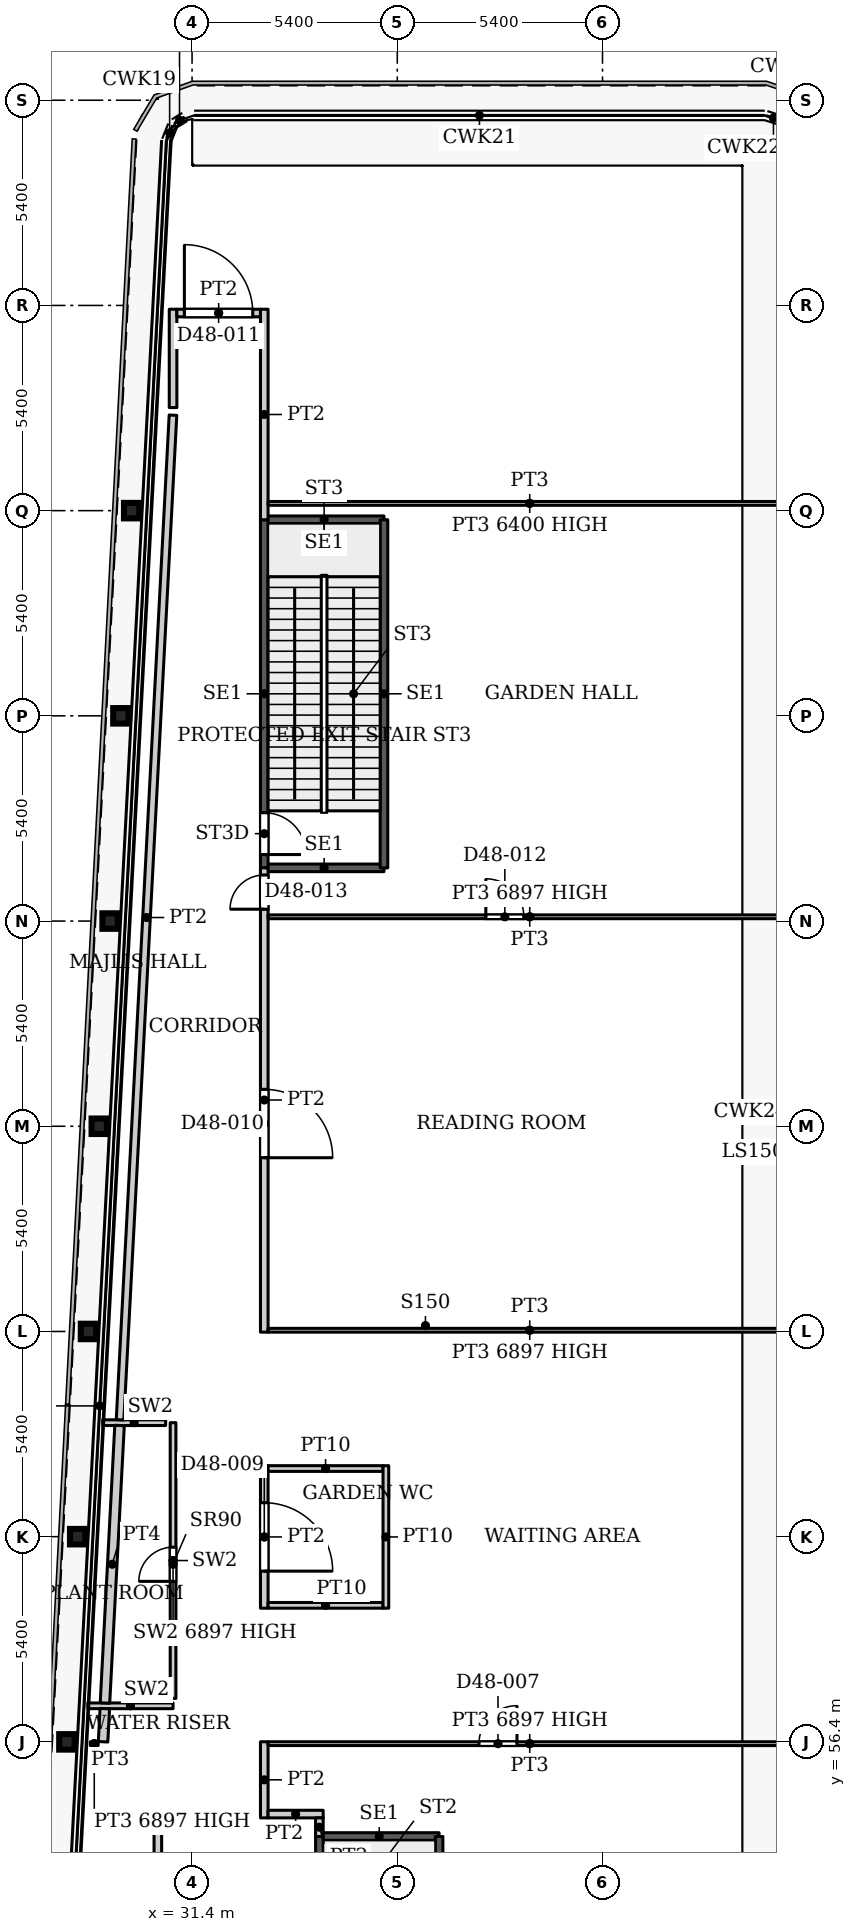
"""IFC4 building model, lengths in metres.
Left out: names, types, materials, properties, quantities, classifications, styles, units other than length and angle.
Written with IfcOpenShell. Run it as: python <this file> out.ifc"""

import sys

from ifc_helpers import new_model, si_unit, direction, frame, frame_2d, origin, origin_2d, place, context, subcontext, project, spatial, rectangle, i_section, extrude, source, transform, mapped, element, fill, save


model = new_model("IFC4")
c1 = context("Model", 3, precision=1e-05, world=origin(), true_north=direction((0.0, 1.0)))
c2 = subcontext(c1, "Body", "Model", "MODEL_VIEW")
j1 = project(units=[si_unit("LENGTHUNIT", "METRE"), si_unit("PLANEANGLEUNIT", "RADIAN")], contexts=[c1])
p1 = place(None, origin())
s1 = spatial("IfcSite", under=j1, at=p1, CompositionType="ELEMENT")
p2 = place(p1, origin())
s2 = spatial("IfcBuilding", under=s1, at=p2, CompositionType="ELEMENT")
p3 = place(p2, frame((0.0, 0.0, 203.3)))
s3 = spatial("IfcBuildingStorey", under=s2, at=p3, CompositionType="ELEMENT", Elevation=203.3)
for number, where, z_axis, x_axis in (
    (1, (28.106, 56.4, 0.0), (0.0, 0.0, 1.0), (1.0, 0.0, 0.0)),
    (2, (28.39, 61.8, 0.0), (0.0, 0.0, 1.0), (1.0, 0.0, 0.0)),
    (3, (28.674, 67.2, 0.0), (0.0, 0.0, 1.0), (1.0, 0.0, 0.0)),
    (4, (28.958, 72.6, 0.0), (0.0, 0.0, 1.0), (1.0, 0.0, 0.0)),
    (5, (29.243, 78.0, 0.0), (0.0, 0.0, 1.0), (1.0, 0.0, 0.0)),
    (6, (29.527, 83.4, 0.0), (0.0, 0.0, 1.0), (1.0, 0.0, 0.0)),
    (7, (29.811, 88.8, 0.0), (0.0, 0.0, 1.0), (1.0, 0.0, 0.0)),
):
    element("IfcColumn", number, at=place(p3, frame(where, z_axis=z_axis, x_axis=x_axis)), inside=s3, PredefinedType="COLUMN", context=c2, shape_type="SweptSolid", body=[
        extrude(i_section(OverallWidth=0.404, OverallDepth=0.407, WebThickness=0.027, FlangeThickness=0.044, FilletRadius=0.012, at=origin_2d()), origin(), (0.0, 0.0, 1.0), 7.8),
    ])
p4 = place(p3, frame((34.75, 53.91, 0.0), z_axis=(0.0, 0.0, 1.0), x_axis=(1.0, 0.0, 0.0)))
e8 = element("IfcWall", 8, at=p4, inside=s3, PredefinedType="SHEAR", context=c2, shape_type="SweptSolid", body=[
    extrude(rectangle(XDim=3.15, YDim=0.2, at=frame_2d((1.575, 0.0))), origin(), (0.0, 0.0, 1.0), 7.8),
])
p5 = place(p3, frame((34.75, 47.5, 0.0), z_axis=(0.0, 0.0, 1.0), x_axis=(0.0, 1.0, 0.0)))
e9 = element("IfcWall", 9, at=p5, inside=s3, PredefinedType="SHEAR", context=c2, shape_type="SweptSolid", body=[
    extrude(rectangle(XDim=6.41, YDim=0.2, at=frame_2d((3.205, 0.0))), origin(), (0.0, 0.0, 1.0), 7.8),
])
p6 = place(p3, frame((37.9, 44.75, 0.0), z_axis=(0.0, 0.0, 1.0), x_axis=(0.0, 1.0, 0.0)))
e10 = element("IfcWall", 10, at=p6, inside=s3, PredefinedType="SHEAR", context=c2, shape_type="SweptSolid", body=[
    extrude(rectangle(XDim=9.16, YDim=0.2, at=frame_2d((4.58, 0.0))), origin(), (0.0, 0.0, 1.0), 7.8),
])
for number, where, z_axis, x_axis in (
    (11, (33.3, 79.4, 0.0), (0.0, 0.0, 1.0), (1.0, 0.0, 0.0)),
    (12, (33.3, 88.56, 0.0), (0.0, 0.0, 1.0), (1.0, 0.0, 0.0)),
):
    element("IfcWall", number, at=place(p3, frame(where, z_axis=z_axis, x_axis=x_axis)), inside=s3, PredefinedType="SHEAR", context=c2, shape_type="SweptSolid", body=[
        extrude(rectangle(XDim=3.15, YDim=0.2, at=frame_2d((1.575, 0.0))), origin(), (0.0, 0.0, 1.0), 7.8),
    ])
p7 = place(p3, frame((33.3, 79.4, 0.0), z_axis=(0.0, 0.0, 1.0), x_axis=(0.0, 1.0, 0.0)))
e13 = element("IfcWall", 13, at=p7, inside=s3, PredefinedType="SHEAR", context=c2, shape_type="SweptSolid", body=[
    extrude(rectangle(XDim=9.16, YDim=0.2, at=frame_2d((4.58, 0.0))), origin(), (0.0, 0.0, 1.0), 7.8),
])
p8 = place(p7, frame((0.35, 0.0, 0.0)))
e14 = element("IfcOpeningElement", 14, at=p8, cuts=e13, PredefinedType="OPENING", context=c2, shape_type="SweptSolid", body=[
    extrude(rectangle(XDim=1.1, YDim=2.2, at=frame_2d((0.55, 1.1))), frame((0.0, 0.11, 0.0), z_axis=(0.0, -1.0, 0.0), x_axis=(1.0, 0.0, 0.0)), (0.0, 0.0, 1.0), 0.22),
])
p9 = place(p3, frame((36.45, 79.4, 0.0), z_axis=(0.0, 0.0, 1.0), x_axis=(0.0, 1.0, 0.0)))
e15 = element("IfcWall", 15, at=p9, inside=s3, PredefinedType="SHEAR", context=c2, shape_type="SweptSolid", body=[
    extrude(rectangle(XDim=9.16, YDim=0.2, at=frame_2d((4.58, 0.0))), origin(), (0.0, 0.0, 1.0), 7.8),
])
p10 = place(p3, frame((28.658, 57.349, 0.0), z_axis=(0.0, 0.0, 1.0), x_axis=(1.0, 0.0, 0.0)))
e16 = element("IfcWall", 16, at=p10, inside=s3, PredefinedType="PARTITIONING", context=c2, shape_type="SweptSolid", body=[
    extrude(rectangle(XDim=2.242, YDim=0.15, at=frame_2d((1.121, 0.0))), origin(), (0.0, 0.0, 1.0), 7.8),
])
p11 = place(p3, frame((30.9, 57.544, 0.0), z_axis=(0.0, 0.0, 1.0), x_axis=(0.0, 1.0, 0.0)))
e17 = element("IfcWall", 17, at=p11, inside=s3, PredefinedType="PARTITIONING", context=c2, shape_type="SweptSolid", body=[
    extrude(rectangle(XDim=7.256, YDim=0.15, at=frame_2d((3.628, 0.0))), origin(), (0.0, 0.0, 1.0), 6.897),
])
p12 = place(p11, frame((3.08, 0.0, 0.0)))
e18 = element("IfcOpeningElement", 18, at=p12, cuts=e17, PredefinedType="OPENING", context=c2, shape_type="SweptSolid", body=[
    extrude(rectangle(XDim=0.9, YDim=2.2, at=frame_2d((0.45, 1.1))), frame((0.0, 0.085, 0.0), z_axis=(0.0, -1.0, 0.0), x_axis=(1.0, 0.0, 0.0)), (0.0, 0.0, 1.0), 0.17),
])
p13 = place(p3, frame((29.05, 64.8, 0.0), z_axis=(0.0, 0.0, 1.0), x_axis=(1.0, 0.0, 0.0)))
e19 = element("IfcWall", 19, at=p13, inside=s3, PredefinedType="PARTITIONING", context=c2, shape_type="SweptSolid", body=[
    extrude(rectangle(XDim=1.655, YDim=0.15, at=frame_2d((0.828, 0.0))), origin(), (0.0, 0.0, 1.0), 7.8),
])
p14 = place(p3, frame((28.724, 56.353, 0.0), z_axis=(0.0, 0.0, 1.0), x_axis=(1.0, 0.0, 0.0)))
e20 = element("IfcWall", 20, at=p14, inside=s3, PredefinedType="PARTITIONING", context=c2, shape_type="SweptSolid", body=[
    extrude(rectangle(XDim=0.205, YDim=0.1, at=frame_2d((0.103, 0.0))), origin(), (0.0, 0.0, 1.0), 6.897),
])
p15 = place(p3, frame((29.058, 56.403, 0.0), z_axis=(0.0, 0.0, 1.0), x_axis=(0.052573510687, 0.998617056721, 0.0)))
e21 = element("IfcWall", 21, at=p15, inside=s3, PredefinedType="PARTITIONING", context=c2, shape_type="SweptSolid", body=[
    extrude(rectangle(XDim=0.873, YDim=0.25, at=frame_2d((0.437, 0.0))), origin(), (0.0, 0.0, 1.0), 7.5),
])
p16 = place(p3, frame((29.108, 57.423, 0.0), z_axis=(0.0, 0.0, 1.0), x_axis=(0.052513275685, 0.99862022605, 0.0)))
e22 = element("IfcWall", 22, at=p16, inside=s3, PredefinedType="PARTITIONING", context=c2, shape_type="SweptSolid", body=[
    extrude(rectangle(XDim=7.313, YDim=0.25, at=frame_2d((3.656, 0.0))), origin(), (0.0, 0.0, 1.0), 7.5),
])
p17 = place(p3, frame((29.505, 64.874, 0.0), z_axis=(0.0, 0.0, 1.0), x_axis=(0.052618850307, 0.998614668725, 0.0)))
e23 = element("IfcWall", 23, at=p17, inside=s3, PredefinedType="PARTITIONING", context=c2, shape_type="SweptSolid", body=[
    extrude(rectangle(XDim=26.475, YDim=0.2, at=frame_2d((13.237, 0.0))), origin(), (0.0, 0.0, 1.0), 7.5),
])
p18 = place(p3, frame((30.5, 47.45, 0.0), z_axis=(0.0, 0.0, 1.0), x_axis=(0.0, 1.0, 0.0)))
e24 = element("IfcWall", 24, at=p18, inside=s3, PredefinedType="PARTITIONING", context=c2, shape_type="SweptSolid", body=[
    extrude(rectangle(XDim=7.05, YDim=0.2, at=frame_2d((3.525, 0.0))), origin(), (0.0, 0.0, 1.0), 7.5),
])
p19 = place(p18, frame((2.65, 0.0, 0.0)))
e25 = element("IfcOpeningElement", 25, at=p19, cuts=e24, PredefinedType="OPENING", context=c2, shape_type="SweptSolid", body=[
    extrude(rectangle(XDim=1.8, YDim=2.1, at=frame_2d((0.9, 1.05))), frame((0.0, 0.11, 0.0), z_axis=(0.0, -1.0, 0.0), x_axis=(1.0, 0.0, 0.0)), (0.0, 0.0, 1.0), 0.22),
])
p20 = place(p3, frame((30.9, 91.512, 0.0), z_axis=(0.0, 0.0, 1.0), x_axis=(0.0, 1.0, 0.0)))
e26 = element("IfcWall", 26, at=p20, inside=s3, PredefinedType="PARTITIONING", context=c2, shape_type="SweptSolid", body=[
    extrude(rectangle(XDim=2.588, YDim=0.2, at=frame_2d((1.294, 0.0))), origin(), (0.0, 0.0, 1.0), 7.5),
])
p21 = place(p3, frame((31.0, 94.0, 0.0), z_axis=(0.0, 0.0, 1.0), x_axis=(1.0, 0.0, 0.0)))
e27 = element("IfcWall", 27, at=p21, inside=s3, PredefinedType="PARTITIONING", context=c2, shape_type="SweptSolid", body=[
    extrude(rectangle(XDim=2.2, YDim=0.2, at=frame_2d((1.1, 0.0))), origin(), (0.0, 0.0, 1.0), 7.5),
])
p22 = place(p21, frame((0.198, 0.0, 0.0)))
e28 = element("IfcOpeningElement", 28, at=p22, cuts=e27, PredefinedType="OPENING", context=c2, shape_type="SweptSolid", body=[
    extrude(rectangle(XDim=1.8, YDim=2.1, at=frame_2d((0.9, 1.05))), frame((0.0, 0.11, 0.0), z_axis=(0.0, -1.0, 0.0), x_axis=(1.0, 0.0, 0.0)), (0.0, 0.0, 1.0), 0.22),
])
p23 = place(p3, frame((33.3, 54.4, 0.0), z_axis=(0.0, 0.0, 1.0), x_axis=(0.0, 1.0, 0.0)))
e29 = element("IfcWall", 29, at=p23, inside=s3, PredefinedType="PARTITIONING", context=c2, shape_type="SweptSolid", body=[
    extrude(rectangle(XDim=2.003, YDim=0.2, at=frame_2d((1.001, 0.0))), origin(), (0.0, 0.0, 1.0), 7.5),
])
p24 = place(p3, frame((33.3, 59.918, 0.0), z_axis=(0.0, 0.0, 1.0), x_axis=(0.0, 1.0, 0.0)))
e30 = element("IfcWall", 30, at=p24, inside=s3, PredefinedType="PARTITIONING", context=c2, shape_type="SweptSolid", body=[
    extrude(rectangle(XDim=3.75, YDim=0.2, at=frame_2d((1.875, 0.0))), origin(), (0.0, 0.0, 1.0), 7.5),
])
p25 = place(p24, frame((0.975, 0.0, 0.0)))
e31 = element("IfcOpeningElement", 31, at=p25, cuts=e30, PredefinedType="OPENING", context=c2, shape_type="SweptSolid", body=[
    extrude(rectangle(XDim=1.8, YDim=2.1, at=frame_2d((0.9, 1.05))), frame((0.0, 0.11, 0.0), z_axis=(0.0, -1.0, 0.0), x_axis=(1.0, 0.0, 0.0)), (0.0, 0.0, 1.0), 0.22),
])
p26 = place(p3, frame((33.3, 67.182, 0.0), z_axis=(0.0, 0.0, 1.0), x_axis=(0.0, 1.0, 0.0)))
e32 = element("IfcWall", 32, at=p26, inside=s3, PredefinedType="PARTITIONING", context=c2, shape_type="SweptSolid", body=[
    extrude(rectangle(XDim=12.218, YDim=0.2, at=frame_2d((6.109, 0.0))), origin(), (0.0, 0.0, 1.0), 7.5),
])
p27 = place(p26, frame((4.59, 0.0, 0.0)))
e33 = element("IfcOpeningElement", 33, at=p27, cuts=e32, PredefinedType="OPENING", context=c2, shape_type="SweptSolid", body=[
    extrude(rectangle(XDim=1.8, YDim=2.1, at=frame_2d((0.9, 1.05))), frame((0.0, 0.11, 0.0), z_axis=(0.0, -1.0, 0.0), x_axis=(1.0, 0.0, 0.0)), (0.0, 0.0, 1.0), 0.22),
])
p28 = place(p26, frame((11.13, 0.0, 0.0)))
e34 = element("IfcOpeningElement", 34, at=p28, cuts=e32, PredefinedType="OPENING", context=c2, shape_type="SweptSolid", body=[
    extrude(rectangle(XDim=0.9, YDim=2.1, at=frame_2d((0.45, 1.05))), frame((0.0, 0.11, 0.0), z_axis=(0.0, -1.0, 0.0), x_axis=(1.0, 0.0, 0.0)), (0.0, 0.0, 1.0), 0.22),
])
p29 = place(p3, frame((33.3, 88.56, 0.0), z_axis=(0.0, 0.0, 1.0), x_axis=(0.0, 1.0, 0.0)))
e35 = element("IfcWall", 35, at=p29, inside=s3, PredefinedType="PARTITIONING", context=c2, shape_type="SweptSolid", body=[
    extrude(rectangle(XDim=5.54, YDim=0.2, at=frame_2d((2.77, 0.0))), origin(), (0.0, 0.0, 1.0), 7.5),
])
p30 = place(p3, frame((33.4, 54.5, 0.0), z_axis=(0.0, 0.0, 1.0), x_axis=(1.0, 0.0, 0.0)))
e36 = element("IfcWall", 36, at=p30, inside=s3, PredefinedType="PARTITIONING", context=c2, shape_type="SweptSolid", body=[
    extrude(rectangle(XDim=1.45, YDim=0.2, at=frame_2d((0.725, 0.0))), origin(), (0.0, 0.0, 1.0), 7.5),
])
p31 = place(p3, frame((33.4, 56.353, 0.0), z_axis=(0.0, 0.0, 1.0), x_axis=(1.0, 0.0, 0.0)))
e37 = element("IfcWall", 37, at=p31, inside=s3, PredefinedType="PARTITIONING", context=c2, shape_type="SweptSolid", body=[
    extrude(rectangle(XDim=13.77, YDim=0.1, at=frame_2d((6.885, 0.0))), origin(), (0.0, 0.0, 1.0), 6.897),
])
p32 = place(p31, frame((5.55, 0.0, 0.0)))
e38 = element("IfcOpeningElement", 38, at=p32, cuts=e37, PredefinedType="OPENING", context=c2, shape_type="SweptSolid", body=[
    extrude(rectangle(XDim=1.0, YDim=2.1, at=frame_2d((0.5, 1.05))), frame((0.0, 0.06, 0.0), z_axis=(0.0, -1.0, 0.0), x_axis=(1.0, 0.0, 0.0)), (0.0, 0.0, 1.0), 0.12),
])
for number, where, z_axis, x_axis in (
    (39, (33.4, 59.993, 0.0), (0.0, 0.0, 1.0), (1.0, 0.0, 0.0)),
    (40, (33.4, 63.593, 0.0), (0.0, 0.0, 1.0), (1.0, 0.0, 0.0)),
):
    element("IfcWall", number, at=place(p3, frame(where, z_axis=z_axis, x_axis=x_axis)), inside=s3, PredefinedType="PARTITIONING", context=c2, shape_type="SweptSolid", body=[
        extrude(rectangle(XDim=3.025, YDim=0.15, at=frame_2d((1.513, 0.0))), origin(), (0.0, 0.0, 1.0), 7.5),
    ])
p33 = place(p3, frame((33.4, 67.232, 0.0), z_axis=(0.0, 0.0, 1.0), x_axis=(1.0, 0.0, 0.0)))
e41 = element("IfcWall", 41, at=p33, inside=s3, PredefinedType="PARTITIONING", context=c2, shape_type="SweptSolid", body=[
    extrude(rectangle(XDim=13.77, YDim=0.1, at=frame_2d((6.885, 0.0))), origin(), (0.0, 0.0, 1.0), 6.897),
])
p34 = place(p3, frame((33.4, 78.112, 0.0), z_axis=(0.0, 0.0, 1.0), x_axis=(1.0, 0.0, 0.0)))
e42 = element("IfcWall", 42, at=p34, inside=s3, PredefinedType="PARTITIONING", context=c2, shape_type="SweptSolid", body=[
    extrude(rectangle(XDim=13.77, YDim=0.1, at=frame_2d((6.885, 0.0))), origin(), (0.0, 0.0, 1.0), 6.897),
])
p35 = place(p34, frame((5.73, 0.0, 0.0)))
e43 = element("IfcOpeningElement", 43, at=p35, cuts=e42, PredefinedType="OPENING", context=c2, shape_type="SweptSolid", body=[
    extrude(rectangle(XDim=1.0, YDim=2.1, at=frame_2d((0.5, 1.05))), frame((0.0, 0.06, 0.0), z_axis=(0.0, -1.0, 0.0), x_axis=(1.0, 0.0, 0.0)), (0.0, 0.0, 1.0), 0.12),
])
p36 = place(p3, frame((33.4, 88.991, 0.0), z_axis=(0.0, 0.0, 1.0), x_axis=(1.0, 0.0, 0.0)))
e44 = element("IfcWall", 44, at=p36, inside=s3, PredefinedType="PARTITIONING", context=c2, shape_type="SweptSolid", body=[
    extrude(rectangle(XDim=13.77, YDim=0.1, at=frame_2d((6.885, 0.0))), origin(), (0.0, 0.0, 1.0), 6.4),
])
p37 = place(p3, frame((34.75, 53.91, 0.0), z_axis=(0.0, 0.0, 1.0), x_axis=(0.0, 1.0, 0.0)))
e45 = element("IfcWall", 45, at=p37, inside=s3, PredefinedType="PARTITIONING", context=c2, shape_type="SweptSolid", body=[
    extrude(rectangle(XDim=0.49, YDim=0.2, at=frame_2d((0.245, 0.0))), origin(), (0.0, 0.0, 1.0), 7.5),
])
p38 = place(p3, frame((36.5, 59.918, 0.0), z_axis=(0.0, 0.0, 1.0), x_axis=(0.0, 1.0, 0.0)))
e46 = element("IfcWall", 46, at=p38, inside=s3, PredefinedType="PARTITIONING", context=c2, shape_type="SweptSolid", body=[
    extrude(rectangle(XDim=3.75, YDim=0.15, at=frame_2d((1.875, 0.0))), origin(), (0.0, 0.0, 1.0), 7.5),
])
m1 = source(origin(), c2, "Body", "SweptSolid", [
    extrude(rectangle(XDim=0.9, YDim=2.2, at=frame_2d((0.45, 1.1))), frame((0.0, 0.025, 0.0), z_axis=(0.0, -1.0, 0.0), x_axis=(1.0, 0.0, 0.0)), (0.0, 0.0, 1.0), 0.05),
])
p39 = place(p12, origin())
e47 = element("IfcDoor", 47, at=p39, inside=s3, OperationType="SINGLE_SWING_LEFT", PredefinedType="DOOR", context=c2, shape_type="MappedRepresentation", body=[
    mapped(m1, transform((0.0, 0.0, 0.0), x_axis=(1.0, 0.0, 0.0), y_axis=(0.0, 1.0, 0.0), z_axis=(0.0, 0.0, 1.0), scale=1.0)),
])
fill(e18, e47)
m2 = source(origin(), c2, "Body", "SweptSolid", [
    extrude(rectangle(XDim=1.1, YDim=2.2, at=frame_2d((0.55, 1.1))), frame((0.0, 0.025, 0.0), z_axis=(0.0, -1.0, 0.0), x_axis=(1.0, 0.0, 0.0)), (0.0, 0.0, 1.0), 0.05),
])
p40 = place(p8, origin())
e48 = element("IfcDoor", 48, at=p40, inside=s3, OperationType="SINGLE_SWING_RIGHT", PredefinedType="DOOR", context=c2, shape_type="MappedRepresentation", body=[
    mapped(m2, transform((0.0, 0.0, 0.0), x_axis=(1.0, 0.0, 0.0), y_axis=(0.0, 1.0, 0.0), z_axis=(0.0, 0.0, 1.0), scale=1.0)),
])
fill(e14, e48)
m3 = source(origin(), c2, "Body", "SweptSolid", [
    extrude(rectangle(XDim=1.0, YDim=2.1, at=frame_2d((0.5, 1.05))), frame((0.0, 0.025, 0.0), z_axis=(0.0, -1.0, 0.0), x_axis=(1.0, 0.0, 0.0)), (0.0, 0.0, 1.0), 0.05),
])
p41 = place(p32, origin())
e49 = element("IfcDoor", 49, at=p41, inside=s3, OperationType="SINGLE_SWING_LEFT", PredefinedType="DOOR", context=c2, shape_type="MappedRepresentation", body=[
    mapped(m3, transform((0.0, 0.0, 0.0), x_axis=(1.0, 0.0, 0.0), y_axis=(0.0, 1.0, 0.0), z_axis=(0.0, 0.0, 1.0), scale=1.0)),
])
fill(e38, e49)
m4 = source(origin(), c2, "Body", "SweptSolid", [
    extrude(rectangle(XDim=1.8, YDim=2.1, at=frame_2d((0.9, 1.05))), frame((0.0, 0.025, 0.0), z_axis=(0.0, -1.0, 0.0), x_axis=(1.0, 0.0, 0.0)), (0.0, 0.0, 1.0), 0.05),
])
p42 = place(p25, origin())
e50 = element("IfcDoor", 50, at=p42, inside=s3, OperationType="DOUBLE_DOOR_SINGLE_SWING", PredefinedType="DOOR", context=c2, shape_type="MappedRepresentation", body=[
    mapped(m4, transform((0.0, 0.0, 0.0), x_axis=(1.0, 0.0, 0.0), y_axis=(0.0, 1.0, 0.0), z_axis=(0.0, 0.0, 1.0), scale=1.0)),
])
fill(e31, e50)
p43 = place(p27, origin())
e51 = element("IfcDoor", 51, at=p43, inside=s3, OperationType="DOUBLE_DOOR_SINGLE_SWING", PredefinedType="DOOR", context=c2, shape_type="MappedRepresentation", body=[
    mapped(m4, transform((0.0, 0.0, 0.0), x_axis=(1.0, 0.0, 0.0), y_axis=(0.0, 1.0, 0.0), z_axis=(0.0, 0.0, 1.0), scale=1.0)),
])
fill(e33, e51)
p44 = place(p22, origin())
e52 = element("IfcDoor", 52, at=p44, inside=s3, OperationType="DOUBLE_DOOR_SINGLE_SWING", PredefinedType="DOOR", context=c2, shape_type="MappedRepresentation", body=[
    mapped(m4, transform((0.0, 0.0, 0.0), x_axis=(1.0, 0.0, 0.0), y_axis=(0.0, 1.0, 0.0), z_axis=(0.0, 0.0, 1.0), scale=1.0)),
])
fill(e28, e52)
p45 = place(p35, origin())
e53 = element("IfcDoor", 53, at=p45, inside=s3, OperationType="SINGLE_SWING_LEFT", PredefinedType="DOOR", context=c2, shape_type="MappedRepresentation", body=[
    mapped(m3, transform((0.0, 0.0, 0.0), x_axis=(1.0, 0.0, 0.0), y_axis=(0.0, 1.0, 0.0), z_axis=(0.0, 0.0, 1.0), scale=1.0)),
])
fill(e43, e53)
m5 = source(origin(), c2, "Body", "SweptSolid", [
    extrude(rectangle(XDim=0.9, YDim=2.1, at=frame_2d((0.45, 1.05))), frame((0.0, 0.025, 0.0), z_axis=(0.0, -1.0, 0.0), x_axis=(1.0, 0.0, 0.0)), (0.0, 0.0, 1.0), 0.05),
])
p46 = place(p28, origin())
e54 = element("IfcDoor", 54, at=p46, inside=s3, OperationType="SINGLE_SWING_LEFT", PredefinedType="DOOR", context=c2, shape_type="MappedRepresentation", body=[
    mapped(m5, transform((0.0, 0.0, 0.0), x_axis=(1.0, 0.0, 0.0), y_axis=(0.0, 1.0, 0.0), z_axis=(0.0, 0.0, 1.0), scale=1.0)),
])
fill(e34, e54)
save(model, sys.argv[1])
